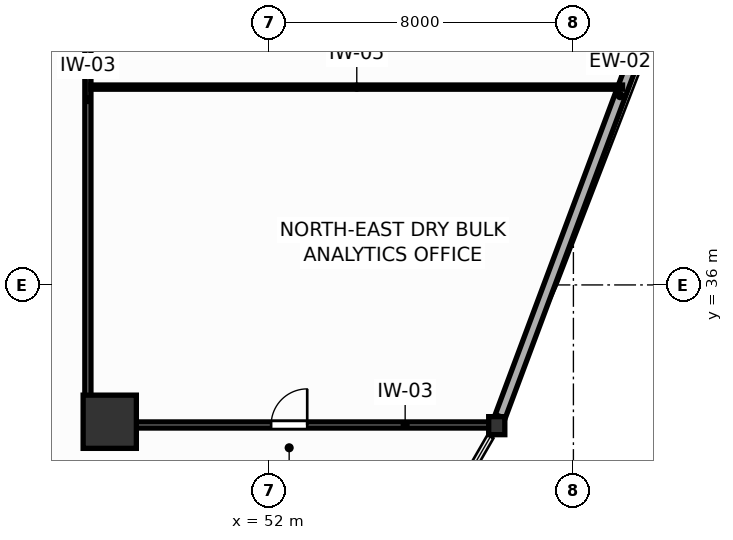
"""IFC4 building model, lengths in metres.
Left out: names, types, materials, properties, quantities, classifications, styles, units other than length and angle.
Written with IfcOpenShell. Run it as: python <this file> out.ifc"""

import sys

from ifc_helpers import new_model, si_unit, direction, frame, frame_2d, origin, origin_2d, place, context, subcontext, project, spatial, rectangle, i_section, extrude, source, transform, mapped, element, fill, save


model = new_model("IFC4")
c1 = context("Model", 3, precision=1e-05, world=origin(), true_north=direction((0.0, 1.0)))
c2 = subcontext(c1, "Body", "Model", "MODEL_VIEW")
j1 = project(units=[si_unit("LENGTHUNIT", "METRE"), si_unit("PLANEANGLEUNIT", "RADIAN")], contexts=[c1])
p1 = place(None, origin())
s1 = spatial("IfcSite", under=j1, at=p1, CompositionType="ELEMENT")
p2 = place(p1, origin())
s2 = spatial("IfcBuilding", under=s1, at=p2, CompositionType="ELEMENT")
p3 = place(p2, frame((0.0, 0.0, 51.3)))
s3 = spatial("IfcBuildingStorey", under=s2, at=p3, CompositionType="ELEMENT", Elevation=51.3)
m1 = source(origin(), c2, "Body", "SweptSolid", [
    extrude(rectangle(XDim=1.4, YDim=1.4, at=origin_2d()), origin(), (0.0, 0.0, 1.0), 3.9),
])
p4 = place(p3, frame((47.8, 32.4, 0.0), z_axis=(0.0, 0.0, 1.0), x_axis=(1.0, 0.0, 0.0)))
e1 = element("IfcColumn", 1, at=p4, inside=s3, PredefinedType="COLUMN", context=c2, shape_type="MappedRepresentation", body=[
    mapped(m1, transform((0.0, 0.0, 0.0), scale=1.0)),
])
m2 = source(origin(), c2, "Body", "SweptSolid", [
    extrude(i_section(OverallWidth=0.424, OverallDepth=0.474, WebThickness=0.045, FlangeThickness=0.072, FilletRadius=0.015, at=origin_2d()), origin(), (0.0, 0.0, 1.0), 3.9),
])
p5 = place(p3, frame((57.983, 32.297, 0.0), z_axis=(0.0, 0.0, 1.0), x_axis=(1.0, 0.0, 0.0)))
e2 = element("IfcColumn", 2, at=p5, inside=s3, PredefinedType="COLUMN", context=c2, shape_type="MappedRepresentation", body=[
    mapped(m2, transform((0.0, 0.0, 0.0), scale=1.0)),
])
p6 = place(p3, frame((58.074, 32.539, 0.0), z_axis=(0.0, 0.0, 1.0), x_axis=(0.350140465982, 0.936697205121, 0.0)))
e3 = element("IfcWall", 3, at=p6, inside=s3, PredefinedType="SOLIDWALL", context=c2, shape_type="SweptSolid", body=[
    extrude(rectangle(XDim=18.022, YDim=0.28, at=frame_2d((9.011, 0.0))), origin(), (0.0, 0.0, 1.0), 3.23),
])
p7 = place(p3, frame((47.225, 32.31, 0.0), z_axis=(0.0, 0.0, 1.0), x_axis=(0.0, 1.0, 0.0)))
e4 = element("IfcWall", 4, at=p7, inside=s3, PredefinedType="PARTITIONING", context=c2, shape_type="SweptSolid", body=[
    extrude(rectangle(XDim=23.984, YDim=0.16, at=frame_2d((11.992, 0.0))), origin(), (0.0, 0.0, 1.0), 3.68),
])
p8 = place(p7, frame((17.311, 0.0, 0.0)))
e5 = element("IfcOpeningElement", 5, at=p8, cuts=e4, PredefinedType="OPENING", context=c2, shape_type="SweptSolid", body=[
    extrude(rectangle(XDim=0.95, YDim=2.05, at=frame_2d((0.475, 1.025))), frame((0.0, 0.09, 0.0), z_axis=(0.0, -1.0, 0.0), x_axis=(1.0, 0.0, 0.0)), (0.0, 0.0, 1.0), 0.18),
])
p9 = place(p3, frame((47.307, 32.315, 0.0), z_axis=(0.0, 0.0, 1.0), x_axis=(1.0, 0.0, 0.0)))
e6 = element("IfcWall", 6, at=p9, inside=s3, PredefinedType="PARTITIONING", context=c2, shape_type="SweptSolid", body=[
    extrude(rectangle(XDim=10.663, YDim=0.16, at=frame_2d((5.332, 0.0))), origin(), (0.0, 0.0, 1.0), 3.18),
])
p10 = place(p9, frame((4.739, 0.0, 0.0)))
e7 = element("IfcOpeningElement", 7, at=p10, cuts=e6, PredefinedType="OPENING", context=c2, shape_type="SweptSolid", body=[
    extrude(rectangle(XDim=0.95, YDim=2.05, at=frame_2d((0.475, 1.025))), frame((0.0, 0.09, 0.0), z_axis=(0.0, -1.0, 0.0), x_axis=(1.0, 0.0, 0.0)), (0.0, 0.0, 1.0), 0.18),
])
p11 = place(p3, frame((47.307, 41.205, 0.0), z_axis=(0.0, 0.0, 1.0), x_axis=(1.0, 0.0, 0.0)))
e8 = element("IfcWall", 8, at=p11, inside=s3, PredefinedType="MOVABLE", context=c2, shape_type="SweptSolid", body=[
    extrude(rectangle(XDim=13.986, YDim=0.11, at=frame_2d((6.993, 0.0))), origin(), (0.0, 0.0, 1.0), 3.68),
])
p12 = place(p10, origin())
e9 = element("IfcDoor", 9, at=p12, inside=s3, OperationType="SINGLE_SWING_RIGHT", PredefinedType="DOOR", context=c2, shape_type="SweptSolid", body=[
    extrude(rectangle(XDim=0.95, YDim=2.05, at=frame_2d((0.475, 1.025))), frame((0.0, 0.025, 0.0), z_axis=(0.0, -1.0, 0.0), x_axis=(1.0, 0.0, 0.0)), (0.0, 0.0, 1.0), 0.05),
])
fill(e7, e9)
save(model, sys.argv[1])
